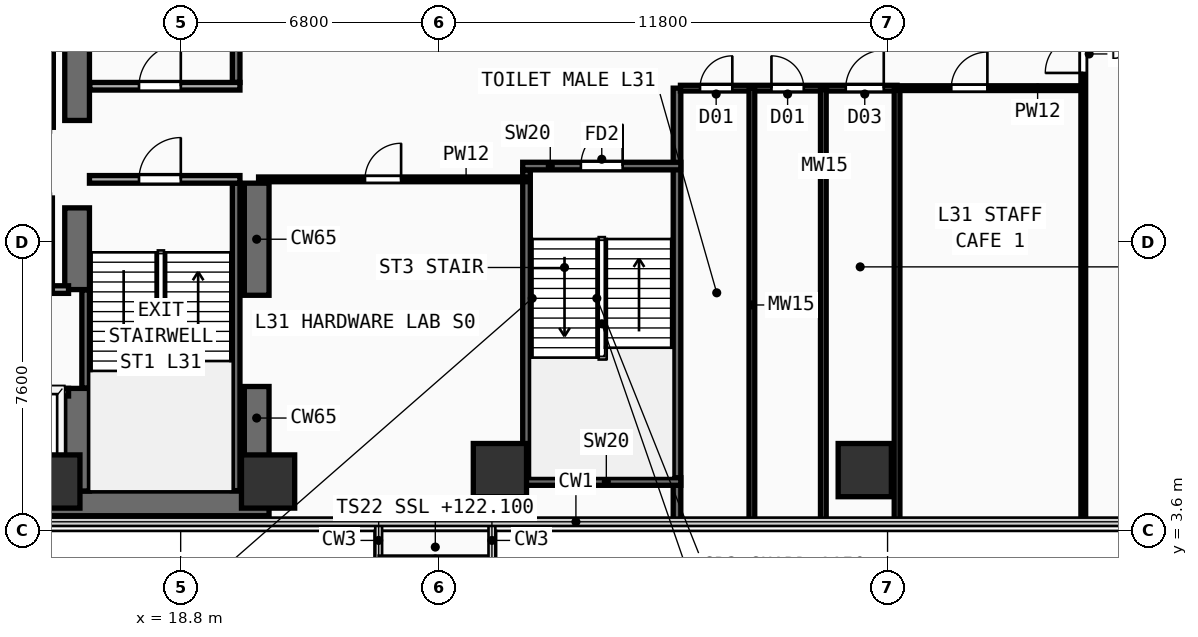
"""IFC4 building model, lengths in metres.
Left out: names, types, materials, properties, quantities, classifications, styles, units other than length and angle.
Written with IfcOpenShell. Run it as: python <this file> out.ifc"""

import sys

from ifc_helpers import new_model, si_unit, direction, frame, frame_2d, origin, origin_2d, place, context, subcontext, project, spatial, rectangle, extrude, element, fill, save


model = new_model("IFC4")
c1 = context("Model", 3, precision=1e-05, world=origin(), true_north=direction((0.0, 1.0)))
c2 = subcontext(c1, "Body", "Model", "MODEL_VIEW")
j1 = project(units=[si_unit("LENGTHUNIT", "METRE"), si_unit("PLANEANGLEUNIT", "RADIAN")], contexts=[c1])
p1 = place(None, origin())
s1 = spatial("IfcSite", under=j1, at=p1, CompositionType="ELEMENT")
p2 = place(p1, origin())
s2 = spatial("IfcBuilding", under=s1, at=p2, CompositionType="ELEMENT")
p3 = place(p2, frame((0.0, 0.0, 122.1)))
s3 = spatial("IfcBuildingStorey", under=s2, at=p3, CompositionType="ELEMENT", Elevation=122.1)
p4 = place(p3, frame((7.125, 4.325, 0.0), z_axis=(0.0, 0.0, 1.0), x_axis=(1.0, 0.0, 0.0)))
e1 = element("IfcWall", 1, at=p4, inside=s3, PredefinedType="SHEAR", context=c2, shape_type="SweptSolid", body=[
    extrude(rectangle(XDim=14.0, YDim=0.65, at=frame_2d((7.0, 0.0))), origin(), (0.0, 0.0, 1.0), 3.54),
])
p5 = place(p3, frame((20.8, 4.65, 0.0), z_axis=(0.0, 0.0, 1.0), x_axis=(0.0, 1.0, 0.0)))
e2 = element("IfcWall", 2, at=p5, inside=s3, PredefinedType="SHEAR", context=c2, shape_type="SweptSolid", body=[
    extrude(rectangle(XDim=2.75, YDim=0.65, at=frame_2d((1.375, 0.0))), origin(), (0.0, 0.0, 1.0), 3.54),
])
p6 = place(p3, frame((20.8, 9.8, 0.0), z_axis=(0.0, 0.0, 1.0), x_axis=(0.0, 1.0, 0.0)))
e3 = element("IfcWall", 3, at=p6, inside=s3, PredefinedType="SHEAR", context=c2, shape_type="SweptSolid", body=[
    extrude(rectangle(XDim=2.95, YDim=0.65, at=frame_2d((1.475, 0.0))), origin(), (0.0, 0.0, 1.0), 3.54),
])
p7 = place(p3, frame((16.075, 4.65, 0.0), z_axis=(0.0, 0.0, 1.0), x_axis=(0.0, 1.0, 0.0)))
e4 = element("IfcWall", 4, at=p7, inside=s3, PredefinedType="SHEAR", context=c2, shape_type="SweptSolid", body=[
    extrude(rectangle(XDim=2.7, YDim=0.65, at=frame_2d((1.35, 0.0))), origin(), (0.0, 0.0, 1.0), 3.54),
])
p8 = place(p3, frame((16.075, 9.95, 0.0), z_axis=(0.0, 0.0, 1.0), x_axis=(0.0, 1.0, 0.0)))
e5 = element("IfcWall", 5, at=p8, inside=s3, PredefinedType="SHEAR", context=c2, shape_type="SweptSolid", body=[
    extrude(rectangle(XDim=2.15, YDim=0.65, at=frame_2d((1.075, 0.0))), origin(), (0.0, 0.0, 1.0), 3.54),
])
p9 = place(p3, frame((16.075, 14.4, 0.0), z_axis=(0.0, 0.0, 1.0), x_axis=(0.0, 1.0, 0.0)))
e6 = element("IfcWall", 6, at=p9, inside=s3, PredefinedType="SHEAR", context=c2, shape_type="SweptSolid", body=[
    extrude(rectangle(XDim=9.1, YDim=0.65, at=frame_2d((4.55, 0.0))), origin(), (0.0, 0.0, 1.0), 3.54),
])
for number, where, z_axis, x_axis in (
    (7, (15.45, 4.9, 0.0), (0.0, 0.0, 1.0), (1.0, 0.0, 0.0)),
    (8, (21.1, 4.9, 0.0), (0.0, 0.0, 1.0), (1.0, 0.0, 0.0)),
    (9, (27.2, 5.2, 0.0), (0.0, 0.0, 1.0), (1.0, 0.0, 0.0)),
    (10, (36.8, 5.2, 0.0), (0.0, 0.0, 1.0), (1.0, 0.0, 0.0)),
):
    element("IfcColumn", number, at=place(p3, frame(where, z_axis=z_axis, x_axis=x_axis)), inside=s3, PredefinedType="COLUMN", context=c2, shape_type="SweptSolid", body=[
        extrude(rectangle(XDim=1.4, YDim=1.4, at=origin_2d()), origin(), (0.0, 0.0, 1.0), 3.54),
    ])
p10 = place(p3, frame((16.3, 7.36, 0.0), z_axis=(0.0, 0.0, 1.0), x_axis=(0.0, 1.0, 0.0)))
e11 = element("IfcWall", 11, at=p10, inside=s3, PredefinedType="SHEAR", context=c2, shape_type="SweptSolid", body=[
    extrude(rectangle(XDim=2.58, YDim=0.2, at=frame_2d((1.29, 0.0))), origin(), (0.0, 0.0, 1.0), 3.54),
])
p11 = place(p3, frame((20.26, 4.66, 0.0), z_axis=(0.0, 0.0, 1.0), x_axis=(0.0, 1.0, 0.0)))
e12 = element("IfcWall", 12, at=p11, inside=s3, PredefinedType="SHEAR", context=c2, shape_type="SweptSolid", body=[
    extrude(rectangle(XDim=8.09, YDim=0.2, at=frame_2d((4.045, 0.0))), origin(), (0.0, 0.0, 1.0), 3.54),
])
p12 = place(p3, frame((16.4, 12.85, 0.0), z_axis=(0.0, 0.0, 1.0), x_axis=(1.0, 0.0, 0.0)))
e13 = element("IfcWall", 13, at=p12, inside=s3, PredefinedType="PARTITIONING", context=c2, shape_type="SweptSolid", body=[
    extrude(rectangle(XDim=3.96, YDim=0.2, at=frame_2d((1.98, 0.0))), origin(), (0.0, 0.0, 1.0), 3.54),
])
p13 = place(p12, frame((1.304, 0.0, 0.0)))
e14 = element("IfcOpeningElement", 14, at=p13, cuts=e13, PredefinedType="OPENING", context=c2, shape_type="SweptSolid", body=[
    extrude(rectangle(XDim=1.1, YDim=2.2, at=frame_2d((0.55, 1.1))), frame((0.0, 0.11, 0.0), z_axis=(0.0, -1.0, 0.0), x_axis=(1.0, 0.0, 0.0)), (0.0, 0.0, 1.0), 0.22),
])
p14 = place(p3, frame((20.26, 15.4, 0.0), z_axis=(0.0, 0.0, 1.0), x_axis=(0.0, 1.0, 0.0)))
e15 = element("IfcWall", 15, at=p14, inside=s3, PredefinedType="SHEAR", context=c2, shape_type="SweptSolid", body=[
    extrude(rectangle(XDim=8.09, YDim=0.2, at=frame_2d((4.045, 0.0))), origin(), (0.0, 0.0, 1.0), 3.54),
])
p15 = place(p3, frame((16.41, 15.3, 0.0), z_axis=(0.0, 0.0, 1.0), x_axis=(1.0, 0.0, 0.0)))
e16 = element("IfcWall", 16, at=p15, inside=s3, PredefinedType="PARTITIONING", context=c2, shape_type="SweptSolid", body=[
    extrude(rectangle(XDim=3.95, YDim=0.2, at=frame_2d((1.975, 0.0))), origin(), (0.0, 0.0, 1.0), 3.54),
])
p16 = place(p15, frame((1.294, 0.0, 0.0)))
e17 = element("IfcOpeningElement", 17, at=p16, cuts=e16, PredefinedType="OPENING", context=c2, shape_type="SweptSolid", body=[
    extrude(rectangle(XDim=1.1, YDim=2.2, at=frame_2d((0.55, 1.1))), frame((0.0, 0.11, 0.0), z_axis=(0.0, -1.0, 0.0), x_axis=(1.0, 0.0, 0.0)), (0.0, 0.0, 1.0), 0.22),
])
p17 = place(p3, frame((27.9, 5.0, 0.0), z_axis=(0.0, 0.0, 1.0), x_axis=(0.0, 1.0, 0.0)))
e18 = element("IfcWall", 18, at=p17, inside=s3, PredefinedType="SHEAR", context=c2, shape_type="SweptSolid", body=[
    extrude(rectangle(XDim=8.1, YDim=0.2, at=frame_2d((4.05, 0.0))), origin(), (0.0, 0.0, 1.0), 3.54),
])
p18 = place(p3, frame((31.86, 3.84, 0.0), z_axis=(0.0, 0.0, 1.0), x_axis=(0.0, 1.0, 0.0)))
e19 = element("IfcWall", 19, at=p18, inside=s3, PredefinedType="SHEAR", context=c2, shape_type="SweptSolid", body=[
    extrude(rectangle(XDim=11.41, YDim=0.2, at=frame_2d((5.705, 0.0))), origin(), (0.0, 0.0, 1.0), 3.54),
])
p19 = place(p3, frame((27.8, 4.9, 0.0), z_axis=(0.0, 0.0, 1.0), x_axis=(1.0, 0.0, 0.0)))
e20 = element("IfcWall", 20, at=p19, inside=s3, PredefinedType="SHEAR", context=c2, shape_type="SweptSolid", body=[
    extrude(rectangle(XDim=4.16, YDim=0.2, at=frame_2d((2.08, 0.0))), origin(), (0.0, 0.0, 1.0), 3.54),
])
p20 = place(p3, frame((27.8, 13.2, 0.0), z_axis=(0.0, 0.0, 1.0), x_axis=(1.0, 0.0, 0.0)))
e21 = element("IfcWall", 21, at=p20, inside=s3, PredefinedType="SHEAR", context=c2, shape_type="SweptSolid", body=[
    extrude(rectangle(XDim=4.16, YDim=0.2, at=frame_2d((2.08, 0.0))), origin(), (0.0, 0.0, 1.0), 3.54),
])
p21 = place(p20, frame((1.53, 0.0, 0.0)))
e22 = element("IfcOpeningElement", 22, at=p21, cuts=e21, PredefinedType="OPENING", context=c2, shape_type="SweptSolid", body=[
    extrude(rectangle(XDim=1.1, YDim=2.2, at=frame_2d((0.55, 1.1))), frame((0.0, 0.11, 0.0), z_axis=(0.0, -1.0, 0.0), x_axis=(1.0, 0.0, 0.0)), (0.0, 0.0, 1.0), 0.22),
])
p22 = place(p3, frame((7.5, 7.25, 0.0), z_axis=(0.0, 0.0, 1.0), x_axis=(1.0, 0.0, 0.0)))
e23 = element("IfcWall", 23, at=p22, inside=s3, PredefinedType="PARTITIONING", context=c2, shape_type="SweptSolid", body=[
    extrude(rectangle(XDim=8.35, YDim=0.2, at=frame_2d((4.175, 0.0))), origin(), (0.0, 0.0, 1.0), 3.54),
])
p23 = place(p22, frame((0.53, 0.0, 0.0)))
e24 = element("IfcOpeningElement", 24, at=p23, cuts=e23, PredefinedType="OPENING", context=c2, shape_type="SweptSolid", body=[
    extrude(rectangle(XDim=1.1, YDim=2.2, at=frame_2d((0.55, 1.1))), frame((0.0, 0.11, 0.0), z_axis=(0.0, -1.0, 0.0), x_axis=(1.0, 0.0, 0.0)), (0.0, 0.0, 1.0), 0.22),
])
p24 = place(p22, frame((2.37, 0.0, 0.0)))
e25 = element("IfcOpeningElement", 25, at=p24, cuts=e23, PredefinedType="OPENING", context=c2, shape_type="SweptSolid", body=[
    extrude(rectangle(XDim=1.1, YDim=2.2, at=frame_2d((0.55, 1.1))), frame((0.0, 0.11, 0.0), z_axis=(0.0, -1.0, 0.0), x_axis=(1.0, 0.0, 0.0)), (0.0, 0.0, 1.0), 0.22),
])
p25 = place(p22, frame((4.33, 0.0, 0.0)))
e26 = element("IfcOpeningElement", 26, at=p25, cuts=e23, PredefinedType="OPENING", context=c2, shape_type="SweptSolid", body=[
    extrude(rectangle(XDim=1.1, YDim=2.2, at=frame_2d((0.55, 1.1))), frame((0.0, 0.11, 0.0), z_axis=(0.0, -1.0, 0.0), x_axis=(1.0, 0.0, 0.0)), (0.0, 0.0, 1.0), 0.22),
])
p26 = place(p22, frame((6.5, 0.0, 0.0)))
e27 = element("IfcOpeningElement", 27, at=p26, cuts=e23, PredefinedType="OPENING", context=c2, shape_type="SweptSolid", body=[
    extrude(rectangle(XDim=1.1, YDim=2.2, at=frame_2d((0.55, 1.1))), frame((0.0, 0.11, 0.0), z_axis=(0.0, -1.0, 0.0), x_axis=(1.0, 0.0, 0.0)), (0.0, 0.0, 1.0), 0.22),
])
p27 = place(p3, frame((7.5, 9.95, 0.0), z_axis=(0.0, 0.0, 1.0), x_axis=(1.0, 0.0, 0.0)))
e28 = element("IfcWall", 28, at=p27, inside=s3, PredefinedType="PARTITIONING", context=c2, shape_type="SweptSolid", body=[
    extrude(rectangle(XDim=8.35, YDim=0.2, at=frame_2d((4.175, 0.0))), origin(), (0.0, 0.0, 1.0), 3.54),
])
p28 = place(p3, frame((15.35, 9.95, 0.0), z_axis=(0.0, 0.0, 1.0), x_axis=(0.0, 1.0, 0.0)))
e29 = element("IfcWall", 29, at=p28, inside=s3, PredefinedType="PARTITIONING", context=c2, shape_type="SweptSolid", body=[
    extrude(rectangle(XDim=2.41, YDim=0.15, at=frame_2d((1.205, 0.0))), origin(), (0.0, 0.0, 1.0), 3.54),
])
p29 = place(p3, frame((15.35, 14.22, 0.0), z_axis=(0.0, 0.0, 1.0), x_axis=(0.0, 1.0, 0.0)))
e30 = element("IfcWall", 30, at=p29, inside=s3, PredefinedType="PARTITIONING", context=c2, shape_type="SweptSolid", body=[
    extrude(rectangle(XDim=2.23, YDim=0.2, at=frame_2d((1.115, 0.0))), origin(), (0.0, 0.0, 1.0), 3.54),
])
p30 = place(p3, frame((31.95, 15.25, 0.0), z_axis=(0.0, 0.0, 1.0), x_axis=(1.0, 0.0, 0.0)))
e31 = element("IfcWall", 31, at=p30, inside=s3, PredefinedType="PLUMBINGWALL", context=c2, shape_type="SweptSolid", body=[
    extrude(rectangle(XDim=5.7, YDim=0.15, at=frame_2d((2.85, 0.0))), origin(), (0.0, 0.0, 1.0), 3.09),
])
p31 = place(p30, frame((0.515, 0.0, 0.0)))
e32 = element("IfcOpeningElement", 32, at=p31, cuts=e31, PredefinedType="OPENING", context=c2, shape_type="SweptSolid", body=[
    extrude(rectangle(XDim=0.85, YDim=2.15, at=frame_2d((0.425, 1.075))), frame((0.0, 0.085, 0.0), z_axis=(0.0, -1.0, 0.0), x_axis=(1.0, 0.0, 0.0)), (0.0, 0.0, 1.0), 0.17),
])
p32 = place(p30, frame((2.395, 0.0, 0.0)))
e33 = element("IfcOpeningElement", 33, at=p32, cuts=e31, PredefinedType="OPENING", context=c2, shape_type="SweptSolid", body=[
    extrude(rectangle(XDim=0.85, YDim=2.15, at=frame_2d((0.425, 1.075))), frame((0.0, 0.085, 0.0), z_axis=(0.0, -1.0, 0.0), x_axis=(1.0, 0.0, 0.0)), (0.0, 0.0, 1.0), 0.17),
])
p33 = place(p30, frame((4.35, 0.0, 0.0)))
e34 = element("IfcOpeningElement", 34, at=p33, cuts=e31, PredefinedType="OPENING", context=c2, shape_type="SweptSolid", body=[
    extrude(rectangle(XDim=1.0, YDim=2.2, at=frame_2d((0.5, 1.1))), frame((0.0, 0.085, 0.0), z_axis=(0.0, -1.0, 0.0), x_axis=(1.0, 0.0, 0.0)), (0.0, 0.0, 1.0), 0.17),
])
for number, where, z_axis, x_axis in (
    (35, (33.83, 3.84, 0.0), (0.0, 0.0, 1.0), (0.0, 1.0, 0.0)),
    (36, (35.71, 3.84, 0.0), (0.0, 0.0, 1.0), (0.0, 1.0, 0.0)),
    (37, (37.65, 3.84, 0.0), (0.0, 0.0, 1.0), (0.0, 1.0, 0.0)),
):
    element("IfcWall", number, at=place(p3, frame(where, z_axis=z_axis, x_axis=x_axis)), inside=s3, PredefinedType="PLUMBINGWALL", context=c2, shape_type="SweptSolid", body=[
        extrude(rectangle(XDim=11.41, YDim=0.15, at=frame_2d((5.705, 0.0))), origin(), (0.0, 0.0, 1.0), 3.54),
    ])
p34 = place(p3, frame((20.85, 12.85, 0.0), z_axis=(0.0, 0.0, 1.0), x_axis=(1.0, 0.0, 0.0)))
e38 = element("IfcWall", 38, at=p34, inside=s3, PredefinedType="PARTITIONING", context=c2, shape_type="SweptSolid", body=[
    extrude(rectangle(XDim=7.05, YDim=0.125, at=frame_2d((3.525, 0.0))), origin(), (0.0, 0.0, 1.0), 3.54),
])
p35 = place(p34, frame((2.8, 0.0, 0.0)))
e39 = element("IfcOpeningElement", 39, at=p35, cuts=e38, PredefinedType="OPENING", context=c2, shape_type="SweptSolid", body=[
    extrude(rectangle(XDim=0.95, YDim=2.15, at=frame_2d((0.475, 1.075))), frame((0.0, 0.073, 0.0), z_axis=(0.0, -1.0, 0.0), x_axis=(1.0, 0.0, 0.0)), (0.0, 0.0, 1.0), 0.145),
])
p36 = place(p3, frame((37.65, 15.25, 0.0), z_axis=(0.0, 0.0, 1.0), x_axis=(1.0, 0.0, 0.0)))
e40 = element("IfcWall", 40, at=p36, inside=s3, PredefinedType="PARTITIONING", context=c2, shape_type="SweptSolid", body=[
    extrude(rectangle(XDim=4.9, YDim=0.125, at=frame_2d((2.45, 0.0))), origin(), (0.0, 0.0, 1.0), 3.09),
])
p37 = place(p36, frame((1.427, 0.0, 0.0)))
e41 = element("IfcOpeningElement", 41, at=p37, cuts=e40, PredefinedType="OPENING", context=c2, shape_type="SweptSolid", body=[
    extrude(rectangle(XDim=0.95, YDim=2.15, at=frame_2d((0.475, 1.075))), frame((0.0, 0.073, 0.0), z_axis=(0.0, -1.0, 0.0), x_axis=(1.0, 0.0, 0.0)), (0.0, 0.0, 1.0), 0.145),
])
p38 = place(p3, frame((42.55, 3.84, 0.0), z_axis=(0.0, 0.0, 1.0), x_axis=(0.0, 1.0, 0.0)))
e42 = element("IfcWall", 42, at=p38, inside=s3, PredefinedType="PARTITIONING", context=c2, shape_type="SweptSolid", body=[
    extrude(rectangle(XDim=20.12, YDim=0.125, at=frame_2d((10.06, 0.0))), origin(), (0.0, 0.0, 1.0), 3.54),
])
p39 = place(p38, frame((11.81, 0.0, 0.0)))
e43 = element("IfcOpeningElement", 43, at=p39, cuts=e42, PredefinedType="OPENING", context=c2, shape_type="SweptSolid", body=[
    extrude(rectangle(XDim=1.0, YDim=2.2, at=frame_2d((0.5, 1.1))), frame((0.0, 0.073, 0.0), z_axis=(0.0, -1.0, 0.0), x_axis=(1.0, 0.0, 0.0)), (0.0, 0.0, 1.0), 0.145),
])
p40 = place(p13, frame((1.1, 0.0, 0.0), z_axis=(0.0, 0.0, 1.0), x_axis=(-1.0, 0.0, 0.0)))
e44 = element("IfcDoor", 44, at=p40, inside=s3, OperationType="SINGLE_SWING_LEFT", PredefinedType="DOOR", context=c2, shape_type="SweptSolid", body=[
    extrude(rectangle(XDim=1.1, YDim=2.2, at=frame_2d((0.55, 1.1))), frame((0.0, 0.025, 0.0), z_axis=(0.0, -1.0, 0.0), x_axis=(1.0, 0.0, 0.0)), (0.0, 0.0, 1.0), 0.05),
])
fill(e14, e44)
p41 = place(p16, origin())
e45 = element("IfcDoor", 45, at=p41, inside=s3, OperationType="SINGLE_SWING_RIGHT", PredefinedType="DOOR", context=c2, shape_type="SweptSolid", body=[
    extrude(rectangle(XDim=1.1, YDim=2.2, at=frame_2d((0.55, 1.1))), frame((0.0, 0.025, 0.0), z_axis=(0.0, -1.0, 0.0), x_axis=(1.0, 0.0, 0.0)), (0.0, 0.0, 1.0), 0.05),
])
fill(e17, e45)
p42 = place(p21, frame((1.1, 0.0, 0.0), z_axis=(0.0, 0.0, 1.0), x_axis=(-1.0, 0.0, 0.0)))
e46 = element("IfcDoor", 46, at=p42, inside=s3, OperationType="SINGLE_SWING_LEFT", PredefinedType="DOOR", context=c2, shape_type="SweptSolid", body=[
    extrude(rectangle(XDim=1.1, YDim=2.2, at=frame_2d((0.55, 1.1))), frame((0.0, 0.025, 0.0), z_axis=(0.0, -1.0, 0.0), x_axis=(1.0, 0.0, 0.0)), (0.0, 0.0, 1.0), 0.05),
])
fill(e22, e46)
p43 = place(p31, origin())
e47 = element("IfcDoor", 47, at=p43, inside=s3, OperationType="SINGLE_SWING_RIGHT", PredefinedType="DOOR", context=c2, shape_type="SweptSolid", body=[
    extrude(rectangle(XDim=0.85, YDim=2.15, at=frame_2d((0.425, 1.075))), frame((0.0, 0.025, 0.0), z_axis=(0.0, -1.0, 0.0), x_axis=(1.0, 0.0, 0.0)), (0.0, 0.0, 1.0), 0.05),
])
fill(e32, e47)
p44 = place(p32, origin())
e48 = element("IfcDoor", 48, at=p44, inside=s3, OperationType="SINGLE_SWING_LEFT", PredefinedType="DOOR", context=c2, shape_type="SweptSolid", body=[
    extrude(rectangle(XDim=0.85, YDim=2.15, at=frame_2d((0.425, 1.075))), frame((0.0, 0.025, 0.0), z_axis=(0.0, -1.0, 0.0), x_axis=(1.0, 0.0, 0.0)), (0.0, 0.0, 1.0), 0.05),
])
fill(e33, e48)
p45 = place(p33, origin())
e49 = element("IfcDoor", 49, at=p45, inside=s3, OperationType="SINGLE_SWING_RIGHT", PredefinedType="DOOR", context=c2, shape_type="SweptSolid", body=[
    extrude(rectangle(XDim=1.0, YDim=2.2, at=frame_2d((0.5, 1.1))), frame((0.0, 0.025, 0.0), z_axis=(0.0, -1.0, 0.0), x_axis=(1.0, 0.0, 0.0)), (0.0, 0.0, 1.0), 0.05),
])
fill(e34, e49)
p46 = place(p35, origin())
e50 = element("IfcDoor", 50, at=p46, inside=s3, OperationType="SINGLE_SWING_RIGHT", PredefinedType="DOOR", context=c2, shape_type="SweptSolid", body=[
    extrude(rectangle(XDim=0.95, YDim=2.15, at=frame_2d((0.475, 1.075))), frame((0.0, 0.025, 0.0), z_axis=(0.0, -1.0, 0.0), x_axis=(1.0, 0.0, 0.0)), (0.0, 0.0, 1.0), 0.05),
])
fill(e39, e50)
p47 = place(p37, origin())
e51 = element("IfcDoor", 51, at=p47, inside=s3, OperationType="SINGLE_SWING_RIGHT", PredefinedType="DOOR", context=c2, shape_type="SweptSolid", body=[
    extrude(rectangle(XDim=0.95, YDim=2.15, at=frame_2d((0.475, 1.075))), frame((0.0, 0.025, 0.0), z_axis=(0.0, -1.0, 0.0), x_axis=(1.0, 0.0, 0.0)), (0.0, 0.0, 1.0), 0.05),
])
fill(e41, e51)
p48 = place(p39, origin())
e52 = element("IfcDoor", 52, at=p48, inside=s3, OperationType="SINGLE_SWING_LEFT", PredefinedType="DOOR", context=c2, shape_type="SweptSolid", body=[
    extrude(rectangle(XDim=1.0, YDim=2.2, at=frame_2d((0.5, 1.1))), frame((0.0, 0.025, 0.0), z_axis=(0.0, -1.0, 0.0), x_axis=(1.0, 0.0, 0.0)), (0.0, 0.0, 1.0), 0.05),
])
fill(e43, e52)
save(model, sys.argv[1])
